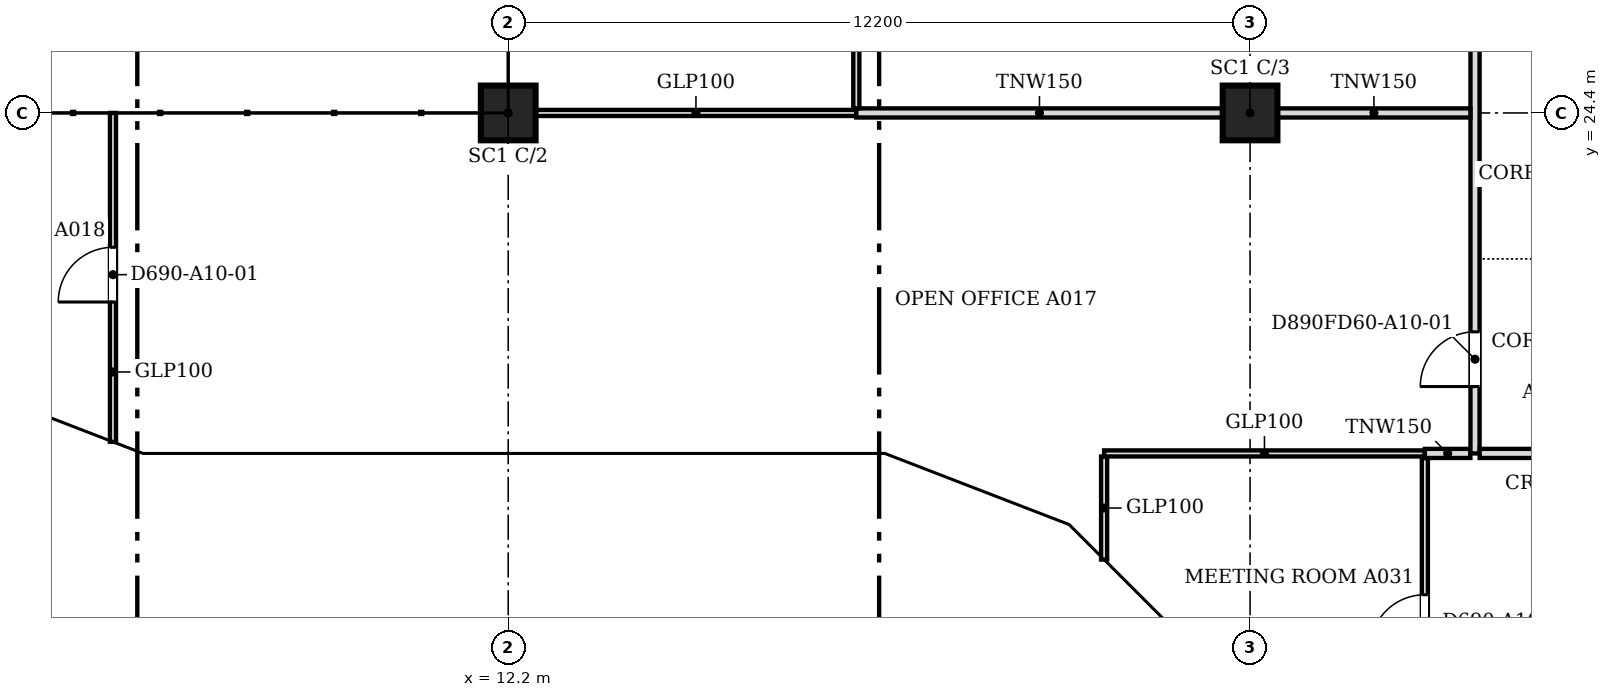
"""IFC4 building model, lengths in metres.
Left out: names, types, materials, properties, quantities, classifications, styles, units other than length and angle.
Written with IfcOpenShell. Run it as: python <this file> out.ifc"""

import sys

from ifc_helpers import new_model, si_unit, direction, frame, frame_2d, origin, origin_2d, place, context, subcontext, project, spatial, polyline, rectangle, outline, extrude, faceted_brep, source, transform, mapped, element, fill, save


model = new_model("IFC4")
c1 = context("Model", 3, precision=1e-05, world=origin(), true_north=direction((0.0, 1.0)))
c2 = subcontext(c1, "Body", "Model", "MODEL_VIEW")
j1 = project(units=[si_unit("LENGTHUNIT", "METRE"), si_unit("PLANEANGLEUNIT", "RADIAN")], contexts=[c1])
p1 = place(None, origin())
s1 = spatial("IfcSite", under=j1, at=p1, CompositionType="ELEMENT")
p2 = place(p1, origin())
s2 = spatial("IfcBuilding", under=s1, at=p2, CompositionType="ELEMENT")
p3 = place(p2, frame((0.0, 0.0, 116.4)))
s3 = spatial("IfcBuildingStorey", under=s2, at=p3, CompositionType="ELEMENT", Elevation=116.4)
for number, where, z_axis, x_axis in (
    (1, (12.2, 24.4, 0.0), (0.0, 0.0, 1.0), (1.0, 0.0, 0.0)),
    (2, (24.4, 24.4, 0.0), (0.0, 0.0, 1.0), (1.0, 0.0, 0.0)),
):
    element("IfcColumn", number, at=place(p3, frame(where, z_axis=z_axis, x_axis=x_axis)), inside=s3, PredefinedType="COLUMN", context=c2, shape_type="SweptSolid", body=[
        extrude(rectangle(XDim=0.9, YDim=0.9, at=origin_2d()), origin(), (0.0, 0.0, 1.0), 3.6),
    ])
m1 = source(origin(), c2, "Body", "Brep", [
    faceted_brep([(0.053, -0.25, 0.0), (3.003, -0.25, 3.8), (0.053, -0.25, 7.6), (0.0, -0.25, 7.531), (0.0, -0.25, 0.068), (0.106, 0.25, 7.532), (2.957, 0.25, 3.86), (2.957, 0.25, 3.74), (0.106, 0.25, 0.068), (3.003, 0.0, 3.8), (0.053, 0.0, 0.0), (0.053, 0.0, 7.6)], [[[0, 1, 2, 3, 4]], [[5, 6, 7, 8]], [[8, 7, 9, 1, 0, 10]], [[6, 5, 11, 2, 1, 9]], [[3, 2, 11]], [[10, 0, 4]], [[8, 10, 4, 3, 11, 5]], [[9, 7, 6]]]),
])
p4 = place(p3, frame((3.344, 19.631, -3.8), z_axis=(0.0, 0.0, 1.0), x_axis=(0.933007896601, -0.359855894603, 0.0)))
e3 = element("IfcWall", 3, at=p4, inside=s3, PredefinedType="SOLIDWALL", context=c2, shape_type="MappedRepresentation", body=[
    mapped(m1, transform((0.0, 0.0, 0.0), scale=1.0)),
])
m2 = source(origin(), c2, "Body", "SweptSolid", [
    extrude(outline(polyline([(0.253, 0.665), (2.687, 3.8), (0.253, 6.935), (0.253, 0.665)])), frame((0.0, 0.26, 0.0), z_axis=(0.0, -1.0, 0.0), x_axis=(1.0, 0.0, 0.0)), (0.0, 0.0, 1.0), 0.52),
])
p5 = place(p4, origin())
e4 = element("IfcOpeningElement", 4, at=p5, cuts=e3, PredefinedType="OPENING", context=c2, shape_type="MappedRepresentation", body=[
    mapped(m2, transform((0.0, 0.0, 0.0), scale=1.0)),
])
m3 = source(origin(), c2, "Body", "Brep", [
    faceted_brep([(3.003, -0.25, 0.0), (6.053, -0.25, 3.8), (3.003, -0.25, 7.6), (0.0, -0.25, 3.8), (0.047, 0.25, 3.859), (3.003, 0.25, 7.6), (6.053, 0.25, 3.8), (3.003, 0.25, 0.0), (0.047, 0.25, 3.741), (0.0, 0.0, 3.8)], [[[0, 1, 2, 3]], [[4, 5, 6, 7, 8]], [[7, 6, 1, 0]], [[6, 5, 2, 1]], [[5, 4, 9, 3, 2]], [[8, 7, 0, 3, 9]], [[8, 9, 4]]]),
])
p6 = place(p3, frame((6.146, 18.55, -3.8), z_axis=(0.0, 0.0, 1.0), x_axis=(1.0, 0.0, 0.0)))
e5 = element("IfcWall", 5, at=p6, inside=s3, PredefinedType="SOLIDWALL", context=c2, shape_type="MappedRepresentation", body=[
    mapped(m3, transform((0.0, 0.0, 0.0), scale=1.0)),
])
m4 = source(origin(), c2, "Body", "SweptSolid", [
    extrude(outline(polyline([(3.005, 0.401), (5.733, 3.8), (3.005, 7.199), (0.319, 3.8), (3.005, 0.401)])), frame((0.0, 0.26, 0.0), z_axis=(0.0, -1.0, 0.0), x_axis=(1.0, 0.0, 0.0)), (0.0, 0.0, 1.0), 0.52),
])
p7 = place(p6, origin())
e6 = element("IfcOpeningElement", 6, at=p7, cuts=e5, PredefinedType="OPENING", context=c2, shape_type="MappedRepresentation", body=[
    mapped(m4, transform((0.0, 0.0, 0.0), scale=1.0)),
])
m5 = source(origin(), c2, "Body", "Brep", [
    faceted_brep([(3.05, -0.25, 0.0), (6.1, -0.25, 3.743), (6.1, -0.25, 3.857), (3.05, -0.25, 7.6), (0.0, -0.25, 3.8), (0.0, 0.25, 3.8), (3.05, 0.25, 7.6), (6.146, 0.25, 3.8), (3.05, 0.25, 0.0), (6.146, -0.0, 3.8)], [[[0, 1, 2, 3, 4]], [[5, 6, 7, 8]], [[8, 7, 9, 1, 0]], [[7, 6, 3, 2, 9]], [[6, 5, 4, 3]], [[5, 8, 0, 4]], [[1, 9, 2]]]),
])
p8 = place(p3, frame((12.2, 18.55, -3.8), z_axis=(0.0, 0.0, 1.0), x_axis=(1.0, 0.0, 0.0)))
e7 = element("IfcWall", 7, at=p8, inside=s3, PredefinedType="SOLIDWALL", context=c2, shape_type="MappedRepresentation", body=[
    mapped(m5, transform((0.0, 0.0, 0.0), scale=1.0)),
])
m6 = source(origin(), c2, "Body", "SweptSolid", [
    extrude(outline(polyline([(3.052, 0.397), (5.824, 3.8), (3.052, 7.202), (0.321, 3.8), (3.052, 0.397)])), frame((0.0, 0.26, 0.0), z_axis=(0.0, -1.0, 0.0), x_axis=(1.0, 0.0, 0.0)), (0.0, 0.0, 1.0), 0.52),
])
p9 = place(p8, origin())
e8 = element("IfcOpeningElement", 8, at=p9, cuts=e7, PredefinedType="OPENING", context=c2, shape_type="MappedRepresentation", body=[
    mapped(m6, transform((0.0, 0.0, 0.0), scale=1.0)),
])
m7 = source(origin(), c2, "Body", "Brep", [
    faceted_brep([(3.096, -0.25, 7.536), (0.047, -0.25, 3.856), (0.047, -0.25, 3.744), (3.096, -0.25, 0.064), (0.0, 0.25, 3.8), (3.149, 0.25, 7.6), (3.202, 0.25, 7.536), (3.202, 0.25, 0.064), (3.149, 0.25, 0.0), (3.149, -0.0, 0.0), (3.149, -0.0, 7.6), (0.0, 0.0, 3.8)], [[[0, 1, 2, 3]], [[4, 5, 6, 7, 8]], [[8, 7, 9]], [[6, 5, 10]], [[5, 4, 11, 1, 0, 10]], [[4, 8, 9, 3, 2, 11]], [[11, 2, 1]], [[3, 9, 7, 6, 10, 0]]]),
])
p10 = place(p3, frame((18.346, 18.55, -3.8), z_axis=(0.0, 0.0, 1.0), x_axis=(0.932985567668, -0.359913782069, 0.0)))
e9 = element("IfcWall", 9, at=p10, inside=s3, PredefinedType="SOLIDWALL", context=c2, shape_type="MappedRepresentation", body=[
    mapped(m7, transform((0.0, 0.0, 0.0), scale=1.0)),
])
m8 = source(origin(), c2, "Body", "SweptSolid", [
    extrude(outline(polyline([(2.949, 6.967), (0.325, 3.8), (2.949, 0.633), (2.949, 6.967)])), frame((0.0, 0.26, 0.0), z_axis=(0.0, -1.0, 0.0), x_axis=(1.0, 0.0, 0.0)), (0.0, 0.0, 1.0), 0.52),
])
p11 = place(p10, origin())
e10 = element("IfcOpeningElement", 10, at=p11, cuts=e9, PredefinedType="OPENING", context=c2, shape_type="MappedRepresentation", body=[
    mapped(m8, transform((0.0, 0.0, 0.0), scale=1.0)),
])
m9 = source(origin(), c2, "Body", "Brep", [
    faceted_brep([(0.106, -0.25, 0.064), (3.156, -0.25, 3.736), (3.156, -0.25, 3.864), (0.106, -0.25, 7.536), (0.0, 0.25, 7.536), (0.053, 0.25, 7.6), (3.209, 0.25, 3.8), (0.053, 0.25, 0.0), (0.0, 0.25, 0.064), (3.209, -0.0, 3.8), (0.053, 0.0, 0.0), (0.053, 0.0, 7.6)], [[[0, 1, 2, 3]], [[4, 5, 6, 7, 8]], [[7, 6, 9, 1, 0, 10]], [[6, 5, 11, 3, 2, 9]], [[5, 4, 11]], [[8, 7, 10]], [[8, 10, 0, 3, 11, 4]], [[1, 9, 2]]]),
])
p12 = place(p3, frame((21.248, 17.454, -3.8), z_axis=(0.0, 0.0, 1.0), x_axis=(0.707106781187, -0.707106781187, 0.0)))
e11 = element("IfcWall", 11, at=p12, inside=s3, PredefinedType="SOLIDWALL", context=c2, shape_type="MappedRepresentation", body=[
    mapped(m9, transform((0.0, 0.0, 0.0), scale=1.0)),
])
m10 = source(origin(), c2, "Body", "SweptSolid", [
    extrude(outline(polyline([(0.253, 0.632), (2.884, 3.8), (0.253, 6.968), (0.253, 0.632)])), frame((0.0, 0.26, 0.0), z_axis=(0.0, -1.0, 0.0), x_axis=(1.0, 0.0, 0.0)), (0.0, 0.0, 1.0), 0.52),
])
p13 = place(p12, origin())
e12 = element("IfcOpeningElement", 12, at=p13, cuts=e11, PredefinedType="OPENING", context=c2, shape_type="MappedRepresentation", body=[
    mapped(m10, transform((0.0, 0.0, 0.0), scale=1.0)),
])
p14 = place(p2, frame((0.0, 0.0, 120.2)))
s4 = spatial("IfcBuildingStorey", under=s2, at=p14, CompositionType="ELEMENT", Elevation=120.2)
m11 = source(origin(), c2, "Body", "Brep", [
    faceted_brep([(2.95, -0.25, 0.0), (2.997, -0.25, 0.059), (2.997, -0.25, 7.541), (2.95, -0.25, 7.6), (0.0, -0.25, 3.8), (0.053, 0.25, 3.868), (2.904, 0.25, 7.54), (2.904, 0.25, 0.06), (0.053, 0.25, 3.732), (2.95, 0.0, 0.0), (2.95, 0.0, 7.6), (0.0, 0.0, 3.8)], [[[0, 1, 2, 3, 4]], [[5, 6, 7, 8]], [[1, 0, 9]], [[10, 3, 2]], [[6, 5, 11, 4, 3, 10]], [[8, 7, 9, 0, 4, 11]], [[8, 11, 5]], [[1, 9, 7, 6, 10, 2]]]),
])
p15 = place(p14, frame((3.394, 19.612, -3.8), z_axis=(0.0, 0.0, 1.0), x_axis=(0.932990326376, -0.359901446078, 0.0)))
e13 = element("IfcWall", 13, at=p15, inside=s4, PredefinedType="SOLIDWALL", context=c2, shape_type="MappedRepresentation", body=[
    mapped(m11, transform((0.0, 0.0, 0.0), scale=1.0)),
])
m12 = source(origin(), c2, "Body", "SweptSolid", [
    extrude(outline(polyline([(2.75, 6.935), (0.316, 3.8), (2.75, 0.665), (2.75, 6.935)])), frame((0.0, 0.26, 0.0), z_axis=(0.0, -1.0, 0.0), x_axis=(1.0, 0.0, 0.0)), (0.0, 0.0, 1.0), 0.52),
])
p16 = place(p15, origin())
e14 = element("IfcOpeningElement", 14, at=p16, cuts=e13, PredefinedType="OPENING", context=c2, shape_type="MappedRepresentation", body=[
    mapped(m12, transform((0.0, 0.0, 0.0), scale=1.0)),
])
m13 = source(origin(), c2, "Body", "Brep", [
    faceted_brep([(0.047, -0.25, 0.0), (3.05, -0.25, 3.8), (0.047, -0.25, 7.6), (0.0, -0.25, 7.54), (0.0, -0.25, 0.06), (0.093, 0.25, 7.541), (3.05, 0.25, 3.8), (0.093, 0.25, 0.059), (0.047, 0.0, 0.0), (0.047, 0.0, 7.6)], [[[0, 1, 2, 3, 4]], [[5, 6, 7]], [[7, 6, 1, 0, 8]], [[6, 5, 9, 2, 1]], [[3, 2, 9]], [[8, 0, 4]], [[7, 8, 4, 3, 9, 5]]]),
])
p17 = place(p14, frame((6.1, 18.55, -3.8), z_axis=(0.0, 0.0, 1.0), x_axis=(1.0, 0.0, 0.0)))
e15 = element("IfcWall", 15, at=p17, inside=s4, PredefinedType="SOLIDWALL", context=c2, shape_type="MappedRepresentation", body=[
    mapped(m13, transform((0.0, 0.0, 0.0), scale=1.0)),
])
m14 = source(origin(), c2, "Body", "SweptSolid", [
    extrude(outline(polyline([(0.247, 0.656), (2.731, 3.8), (0.247, 6.944), (0.247, 0.656)])), frame((0.0, 0.26, 0.0), z_axis=(0.0, -1.0, 0.0), x_axis=(1.0, 0.0, 0.0)), (0.0, 0.0, 1.0), 0.52),
])
p18 = place(p17, origin())
e16 = element("IfcOpeningElement", 16, at=p18, cuts=e15, PredefinedType="OPENING", context=c2, shape_type="MappedRepresentation", body=[
    mapped(m14, transform((0.0, 0.0, 0.0), scale=1.0)),
])
m15 = source(origin(), c2, "Body", "SweptSolid", [
    extrude(outline(polyline([(3.05, 0.0), (6.1, 3.8), (3.05, 7.6), (0.0, 3.8), (3.05, 0.0)])), frame((0.0, 0.25, 0.0), z_axis=(0.0, -1.0, 0.0), x_axis=(1.0, 0.0, 0.0)), (0.0, 0.0, 1.0), 0.5),
])
p19 = place(p14, frame((9.15, 18.55, -3.8), z_axis=(0.0, 0.0, 1.0), x_axis=(1.0, 0.0, 0.0)))
e17 = element("IfcWall", 17, at=p19, inside=s4, PredefinedType="SOLIDWALL", context=c2, shape_type="MappedRepresentation", body=[
    mapped(m15, transform((0.0, 0.0, 0.0), scale=1.0)),
])
m16 = source(origin(), c2, "Body", "SweptSolid", [
    extrude(outline(polyline([(3.05, 0.399), (5.78, 3.8), (3.05, 7.201), (0.321, 3.8), (3.05, 0.399)])), frame((0.0, 0.26, 0.0), z_axis=(0.0, -1.0, 0.0), x_axis=(1.0, 0.0, 0.0)), (0.0, 0.0, 1.0), 0.52),
])
p20 = place(p19, origin())
e18 = element("IfcOpeningElement", 18, at=p20, cuts=e17, PredefinedType="OPENING", context=c2, shape_type="MappedRepresentation", body=[
    mapped(m16, transform((0.0, 0.0, 0.0), scale=1.0)),
])
m17 = source(origin(), c2, "Body", "Brep", [
    faceted_brep([(3.05, -0.25, 7.543), (0.0, -0.25, 3.8), (3.05, -0.25, 0.057), (0.0, 0.25, 3.8), (3.096, 0.25, 7.6), (3.143, 0.25, 7.544), (3.143, 0.25, 0.056), (3.096, 0.25, 0.0), (3.096, -0.0, 0.0), (3.096, -0.0, 7.6)], [[[0, 1, 2]], [[3, 4, 5, 6, 7]], [[7, 6, 8]], [[5, 4, 9]], [[4, 3, 1, 0, 9]], [[3, 7, 8, 2, 1]], [[2, 8, 6, 5, 9, 0]]]),
])
p21 = place(p14, frame((15.25, 18.55, -3.8), z_axis=(0.0, 0.0, 1.0), x_axis=(1.0, 0.0, 0.0)))
e19 = element("IfcWall", 19, at=p21, inside=s4, PredefinedType="SOLIDWALL", context=c2, shape_type="MappedRepresentation", body=[
    mapped(m17, transform((0.0, 0.0, 0.0), scale=1.0)),
])
m18 = source(origin(), c2, "Body", "SweptSolid", [
    extrude(outline(polyline([(2.896, 6.959), (0.323, 3.8), (2.896, 0.641), (2.896, 6.959)])), frame((0.0, 0.26, 0.0), z_axis=(0.0, -1.0, 0.0), x_axis=(1.0, 0.0, 0.0)), (0.0, 0.0, 1.0), 0.52),
])
p22 = place(p21, origin())
e20 = element("IfcOpeningElement", 20, at=p22, cuts=e19, PredefinedType="OPENING", context=c2, shape_type="MappedRepresentation", body=[
    mapped(m18, transform((0.0, 0.0, 0.0), scale=1.0)),
])
m19 = source(origin(), c2, "Body", "Brep", [
    faceted_brep([(0.093, -0.25, 0.056), (3.143, -0.25, 3.736), (3.143, -0.25, 3.864), (0.093, -0.25, 7.544), (0.0, 0.25, 7.543), (0.047, 0.25, 7.6), (3.196, 0.25, 3.8), (0.047, 0.25, 0.0), (0.0, 0.25, 0.057), (3.196, -0.0, 3.8), (0.047, 0.0, 0.0), (0.047, 0.0, 7.6)], [[[0, 1, 2, 3]], [[4, 5, 6, 7, 8]], [[7, 6, 9, 1, 0, 10]], [[6, 5, 11, 3, 2, 9]], [[5, 4, 11]], [[8, 7, 10]], [[8, 10, 0, 3, 11, 4]], [[1, 9, 2]]]),
])
p23 = place(p14, frame((18.303, 18.567, -3.8), z_axis=(0.0, 0.0, 1.0), x_axis=(0.932978940178, -0.359930961693, 0.0)))
e21 = element("IfcWall", 21, at=p23, inside=s4, PredefinedType="SOLIDWALL", context=c2, shape_type="MappedRepresentation", body=[
    mapped(m19, transform((0.0, 0.0, 0.0), scale=1.0)),
])
m20 = source(origin(), c2, "Body", "SweptSolid", [
    extrude(outline(polyline([(0.247, 0.633), (2.871, 3.8), (0.247, 6.967), (0.247, 0.633)])), frame((0.0, 0.26, 0.0), z_axis=(0.0, -1.0, 0.0), x_axis=(1.0, 0.0, 0.0)), (0.0, 0.0, 1.0), 0.52),
])
p24 = place(p23, origin())
e22 = element("IfcOpeningElement", 22, at=p24, cuts=e21, PredefinedType="OPENING", context=c2, shape_type="MappedRepresentation", body=[
    mapped(m20, transform((0.0, 0.0, 0.0), scale=1.0)),
])
m21 = source(origin(), c2, "Body", "Brep", [
    faceted_brep([(3.103, -0.25, 7.536), (0.053, -0.25, 3.864), (0.053, -0.25, 3.736), (3.103, -0.25, 0.064), (0.0, 0.25, 3.8), (3.156, 0.25, 7.6), (3.209, 0.25, 7.536), (3.209, 0.25, 0.064), (3.156, 0.25, 0.0), (3.156, -0.0, 0.0), (3.156, -0.0, 7.6), (0.0, 0.0, 3.8)], [[[0, 1, 2, 3]], [[4, 5, 6, 7, 8]], [[8, 7, 9]], [[6, 5, 10]], [[5, 4, 11, 1, 0, 10]], [[4, 8, 9, 3, 2, 11]], [[11, 2, 1]], [[3, 9, 7, 6, 10, 0]]]),
])
p25 = place(p14, frame((21.285, 17.417, -3.8), z_axis=(0.0, 0.0, 1.0), x_axis=(0.707106781187, -0.707106781187, 0.0)))
e23 = element("IfcWall", 23, at=p25, inside=s4, PredefinedType="SOLIDWALL", context=c2, shape_type="MappedRepresentation", body=[
    mapped(m21, transform((0.0, 0.0, 0.0), scale=1.0)),
])
m22 = source(origin(), c2, "Body", "SweptSolid", [
    extrude(outline(polyline([(2.956, 6.968), (0.325, 3.8), (2.956, 0.632), (2.956, 6.968)])), frame((0.0, 0.26, 0.0), z_axis=(0.0, -1.0, 0.0), x_axis=(1.0, 0.0, 0.0)), (0.0, 0.0, 1.0), 0.52),
])
p26 = place(p25, origin())
e24 = element("IfcOpeningElement", 24, at=p26, cuts=e23, PredefinedType="OPENING", context=c2, shape_type="MappedRepresentation", body=[
    mapped(m22, transform((0.0, 0.0, 0.0), scale=1.0)),
])
p27 = place(p3, frame((27.275, 13.276, 0.0), z_axis=(0.0, 0.0, 1.0), x_axis=(0.0, 1.0, 0.0)))
e25 = element("IfcWall", 25, at=p27, inside=s3, PredefinedType="PARTITIONING", context=c2, shape_type="SweptSolid", body=[
    extrude(rectangle(XDim=5.448, YDim=0.1, at=frame_2d((2.724, 0.0))), origin(), (0.0, 0.0, 1.0), 3.067),
])
m23 = source(origin(), c2, "Body", "SweptSolid", [
    extrude(rectangle(XDim=0.9, YDim=2.1, at=frame_2d((0.45, 1.05))), frame((0.0, 0.06, 0.0), z_axis=(0.0, -1.0, 0.0), x_axis=(1.0, 0.0, 0.0)), (0.0, 0.0, 1.0), 0.12),
])
p28 = place(p27, frame((2.3, 0.0, 0.0)))
e26 = element("IfcOpeningElement", 26, at=p28, cuts=e25, PredefinedType="OPENING", context=c2, shape_type="MappedRepresentation", body=[
    mapped(m23, transform((0.0, 0.0, 0.0), scale=1.0)),
])
p29 = place(p3, frame((22.0, 17.055, 0.0), z_axis=(0.0, 0.0, 1.0), x_axis=(0.0, 1.0, 0.0)))
e27 = element("IfcWall", 27, at=p29, inside=s3, PredefinedType="PARTITIONING", context=c2, shape_type="SweptSolid", body=[
    extrude(rectangle(XDim=1.694, YDim=0.1, at=frame_2d((0.847, 0.0))), origin(), (0.0, 0.0, 1.0), 3.067),
])
p30 = place(p3, frame((22.0, 18.8, 0.0), z_axis=(0.0, 0.0, 1.0), x_axis=(1.0, 0.0, 0.0)))
e28 = element("IfcWall", 28, at=p30, inside=s3, PredefinedType="PARTITIONING", context=c2, shape_type="SweptSolid", body=[
    extrude(rectangle(XDim=5.274, YDim=0.1, at=frame_2d((2.637, 0.0))), origin(), (0.0, 0.0, 1.0), 3.067),
])
p31 = place(p3, frame((27.275, 18.8, 0.0), z_axis=(0.0, 0.0, 1.0), x_axis=(1.0, 0.0, 0.0)))
e29 = element("IfcWall", 29, at=p31, inside=s3, PredefinedType="PARTITIONING", context=c2, shape_type="SweptSolid", body=[
    extrude(rectangle(XDim=0.749, YDim=0.15, at=frame_2d((0.375, 0.0))), origin(), (0.0, 0.0, 1.0), 3.067),
])
p32 = place(p3, frame((28.1, 18.8, 0.0), z_axis=(0.0, 0.0, 1.0), x_axis=(0.0, 1.0, 0.0)))
e30 = element("IfcWall", 30, at=p32, inside=s3, PredefinedType="PARTITIONING", context=c2, shape_type="SweptSolid", body=[
    extrude(rectangle(XDim=26.024, YDim=0.15, at=frame_2d((13.012, 0.0))), origin(), (0.0, 0.0, 1.0), 3.067),
])
m24 = source(origin(), c2, "Body", "SweptSolid", [
    extrude(rectangle(XDim=0.9, YDim=2.1, at=frame_2d((0.45, 1.05))), frame((0.0, 0.085, 0.0), z_axis=(0.0, -1.0, 0.0), x_axis=(1.0, 0.0, 0.0)), (0.0, 0.0, 1.0), 0.17),
])
p33 = place(p32, frame((1.1, 0.0, 0.0)))
e31 = element("IfcOpeningElement", 31, at=p33, cuts=e30, PredefinedType="OPENING", context=c2, shape_type="MappedRepresentation", body=[
    mapped(m24, transform((0.0, 0.0, 0.0), scale=1.0)),
])
p34 = place(p32, frame((14.301, 0.0, 0.0)))
e32 = element("IfcOpeningElement", 32, at=p34, cuts=e30, PredefinedType="OPENING", context=c2, shape_type="MappedRepresentation", body=[
    mapped(m24, transform((0.0, 0.0, 0.0), scale=1.0)),
])
p35 = place(p32, frame((8.2, 0.0, 0.0)))
e33 = element("IfcOpeningElement", 33, at=p35, cuts=e30, PredefinedType="OPENING", context=c2, shape_type="MappedRepresentation", body=[
    mapped(m24, transform((0.0, 0.0, 0.0), scale=1.0)),
])
p36 = place(p32, frame((21.5, 0.0, 0.0)))
e34 = element("IfcOpeningElement", 34, at=p36, cuts=e30, PredefinedType="OPENING", context=c2, shape_type="MappedRepresentation", body=[
    mapped(m24, transform((0.0, 0.0, 0.0), scale=1.0)),
])
p37 = place(p3, frame((28.176, 18.8, 0.0), z_axis=(0.0, 0.0, 1.0), x_axis=(1.0, 0.0, 0.0)))
e35 = element("IfcWall", 35, at=p37, inside=s3, PredefinedType="PARTITIONING", context=c2, shape_type="SweptSolid", body=[
    extrude(rectangle(XDim=2.248, YDim=0.15, at=frame_2d((1.124, 0.0))), origin(), (0.0, 0.0, 1.0), 3.067),
])
p38 = place(p3, frame((5.7, 18.99, 0.0), z_axis=(0.0, 0.0, 1.0), x_axis=(0.0, 1.0, 0.0)))
e36 = element("IfcWall", 36, at=p38, inside=s3, PredefinedType="PARTITIONING", context=c2, shape_type="SweptSolid", body=[
    extrude(rectangle(XDim=5.41, YDim=0.1, at=frame_2d((2.705, 0.0))), origin(), (0.0, 0.0, 1.0), 3.067),
])
p39 = place(p38, frame((2.3, 0.0, 0.0)))
e37 = element("IfcOpeningElement", 37, at=p39, cuts=e36, PredefinedType="OPENING", context=c2, shape_type="MappedRepresentation", body=[
    mapped(m23, transform((0.0, 0.0, 0.0), scale=1.0)),
])
p40 = place(p3, frame((12.651, 24.4, 0.0), z_axis=(0.0, 0.0, 1.0), x_axis=(1.0, 0.0, 0.0)))
e38 = element("IfcWall", 38, at=p40, inside=s3, PredefinedType="PARTITIONING", context=c2, shape_type="SweptSolid", body=[
    extrude(rectangle(XDim=5.273, YDim=0.1, at=frame_2d((2.637, 0.0))), origin(), (0.0, 0.0, 1.0), 3.067),
])
p41 = place(p3, frame((17.925, 24.4, 0.0), z_axis=(0.0, 0.0, 1.0), x_axis=(1.0, 0.0, 0.0)))
e39 = element("IfcWall", 39, at=p41, inside=s3, PredefinedType="PARTITIONING", context=c2, shape_type="SweptSolid", body=[
    extrude(rectangle(XDim=6.024, YDim=0.15, at=frame_2d((3.012, 0.0))), origin(), (0.0, 0.0, 1.0), 3.067),
])
p42 = place(p3, frame((24.851, 24.4, 0.0), z_axis=(0.0, 0.0, 1.0), x_axis=(1.0, 0.0, 0.0)))
e40 = element("IfcWall", 40, at=p42, inside=s3, PredefinedType="PARTITIONING", context=c2, shape_type="SweptSolid", body=[
    extrude(rectangle(XDim=3.173, YDim=0.15, at=frame_2d((1.586, 0.0))), origin(), (0.0, 0.0, 1.0), 3.067),
])
p43 = place(p3, frame((17.925, 24.476, 0.0), z_axis=(0.0, 0.0, 1.0), x_axis=(0.0, 1.0, 0.0)))
e41 = element("IfcWall", 41, at=p43, inside=s3, PredefinedType="PARTITIONING", context=c2, shape_type="SweptSolid", body=[
    extrude(rectangle(XDim=5.948, YDim=0.1, at=frame_2d((2.974, 0.0))), origin(), (0.0, 0.0, 1.0), 3.067),
])
p44 = place(p43, frame((2.5, 0.0, 0.0)))
e42 = element("IfcOpeningElement", 42, at=p44, cuts=e41, PredefinedType="OPENING", context=c2, shape_type="MappedRepresentation", body=[
    mapped(m23, transform((0.0, 0.0, 0.0), scale=1.0)),
])
m25 = source(origin(), c2, "Body", "SweptSolid", [
    extrude(rectangle(XDim=0.9, YDim=2.1, at=frame_2d((0.45, 1.05))), frame((0.0, 0.025, 0.0), z_axis=(0.0, -1.0, 0.0), x_axis=(1.0, 0.0, 0.0)), (0.0, 0.0, 1.0), 0.05),
])
p45 = place(p33, origin())
e43 = element("IfcDoor", 43, at=p45, inside=s3, OperationType="SINGLE_SWING_LEFT", PredefinedType="DOOR", context=c2, shape_type="MappedRepresentation", body=[
    mapped(m25, transform((0.0, 0.0, 0.0), scale=1.0)),
])
fill(e31, e43)
p46 = place(p39, origin())
e44 = element("IfcDoor", 44, at=p46, inside=s3, OperationType="SINGLE_SWING_LEFT", PredefinedType="DOOR", context=c2, shape_type="MappedRepresentation", body=[
    mapped(m25, transform((0.0, 0.0, 0.0), scale=1.0)),
])
fill(e37, e44)
p47 = place(p28, origin())
e45 = element("IfcDoor", 45, at=p47, inside=s3, OperationType="SINGLE_SWING_LEFT", PredefinedType="DOOR", context=c2, shape_type="MappedRepresentation", body=[
    mapped(m25, transform((0.0, 0.0, 0.0), scale=1.0)),
])
fill(e26, e45)
save(model, sys.argv[1])
